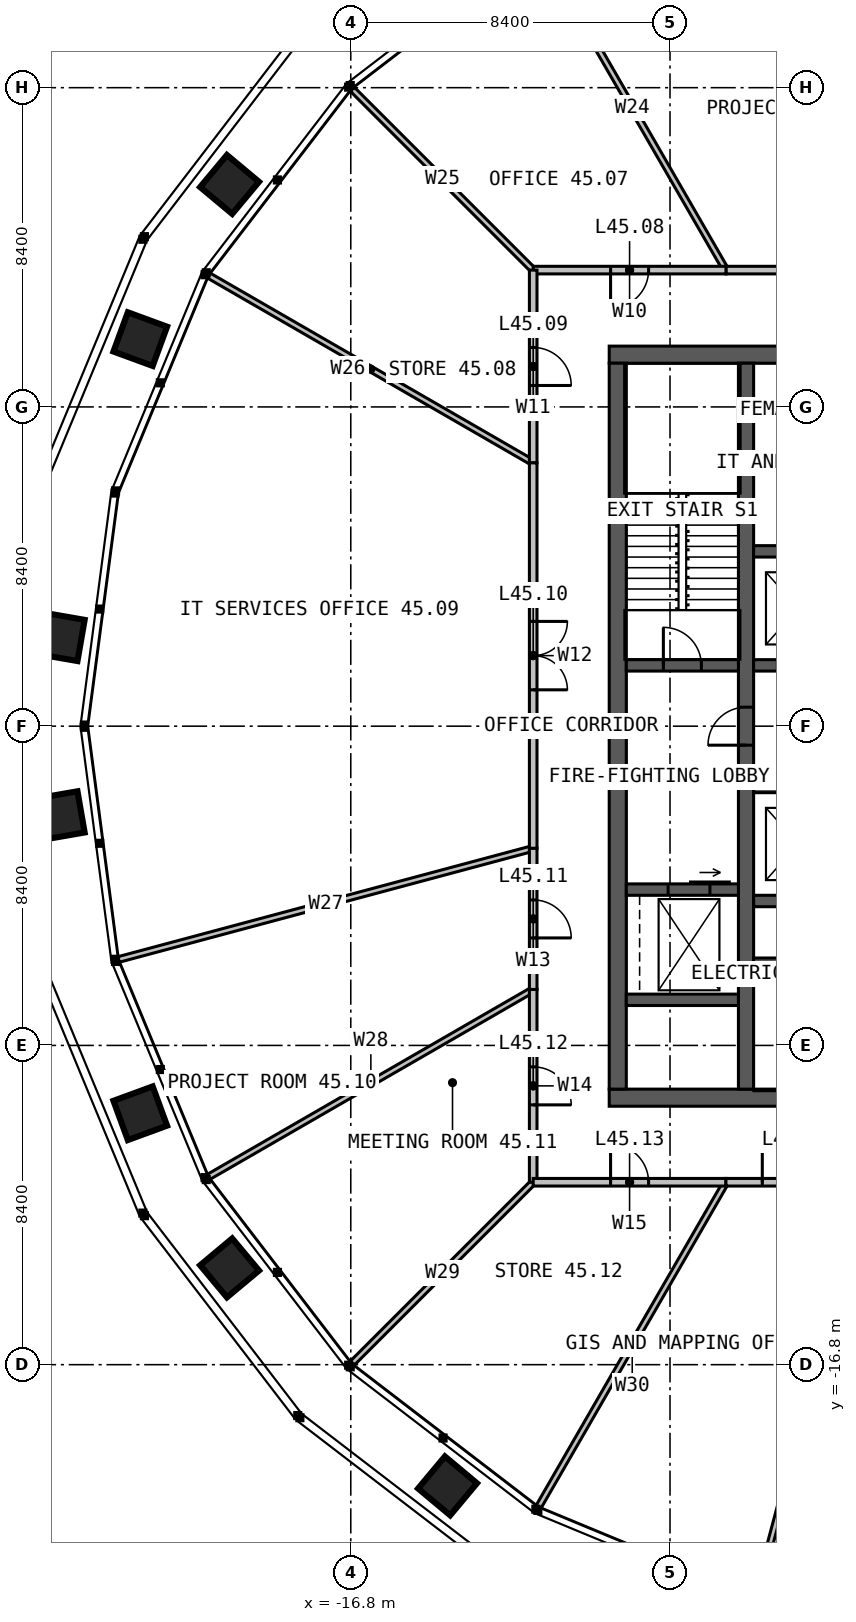
"""IFC4 building model, lengths in metres.
Left out: names, types, materials, properties, quantities, classifications, styles, units other than length and angle.
Written with IfcOpenShell. Run it as: python <this file> out.ifc"""

import sys

from ifc_helpers import new_model, si_unit, direction, frame, frame_2d, origin, place, context, subcontext, project, spatial, rectangle, extrude, element, fill, save


model = new_model("IFC4")
c1 = context("Model", 3, precision=1e-05, world=origin(), true_north=direction((0.0, 1.0)))
c2 = subcontext(c1, "Body", "Model", "MODEL_VIEW")
j1 = project(units=[si_unit("LENGTHUNIT", "METRE"), si_unit("PLANEANGLEUNIT", "RADIAN")], contexts=[c1])
p1 = place(None, origin())
s1 = spatial("IfcSite", under=j1, at=p1, CompositionType="ELEMENT")
p2 = place(p1, origin())
s2 = spatial("IfcBuilding", under=s1, at=p2, CompositionType="ELEMENT")
p3 = place(p2, frame((0.0, 0.0, 187.0)))
s3 = spatial("IfcBuildingStorey", under=s2, at=p3, CompositionType="ELEMENT", Elevation=187.0)
p4 = place(p3, frame((-10.0, 9.775, 0.0), z_axis=(0.0, 0.0, 1.0), x_axis=(1.0, 0.0, 0.0)))
e1 = element("IfcWall", 1, at=p4, inside=s3, PredefinedType="SOLIDWALL", context=c2, shape_type="SweptSolid", body=[
    extrude(rectangle(XDim=20.0, YDim=0.45, at=frame_2d((10.0, 0.0))), origin(), (0.0, 0.0, 1.0), 4.0),
])
p5 = place(p4, frame((9.4, 0.0, 0.0)))
e2 = element("IfcOpeningElement", 2, at=p5, cuts=e1, PredefinedType="OPENING", context=c2, shape_type="SweptSolid", body=[
    extrude(rectangle(XDim=1.2, YDim=2.2, at=frame_2d((0.6, 1.1))), frame((0.0, 0.235, 0.0), z_axis=(0.0, -1.0, 0.0), x_axis=(1.0, 0.0, 0.0)), (0.0, 0.0, 1.0), 0.47),
])
p6 = place(p3, frame((10.0, -9.775, 0.0), z_axis=(0.0, 0.0, 1.0), x_axis=(-1.0, 0.0, 0.0)))
e3 = element("IfcWall", 3, at=p6, inside=s3, PredefinedType="SOLIDWALL", context=c2, shape_type="SweptSolid", body=[
    extrude(rectangle(XDim=20.0, YDim=0.45, at=frame_2d((10.0, 0.0))), origin(), (0.0, 0.0, 1.0), 4.0),
])
p7 = place(p6, frame((6.875, 0.0, 0.0)))
e4 = element("IfcOpeningElement", 4, at=p7, cuts=e3, PredefinedType="OPENING", context=c2, shape_type="SweptSolid", body=[
    extrude(rectangle(XDim=1.2, YDim=2.2, at=frame_2d((0.6, 1.1))), frame((0.0, 0.235, 0.0), z_axis=(0.0, -1.0, 0.0), x_axis=(1.0, 0.0, 0.0)), (0.0, 0.0, 1.0), 0.47),
])
p8 = place(p3, frame((-9.775, 9.55, 0.0), z_axis=(0.0, 0.0, 1.0), x_axis=(0.0, -1.0, 0.0)))
e5 = element("IfcWall", 5, at=p8, inside=s3, PredefinedType="SOLIDWALL", context=c2, shape_type="SweptSolid", body=[
    extrude(rectangle(XDim=19.1, YDim=0.45, at=frame_2d((9.55, 0.0))), origin(), (0.0, 0.0, 1.0), 4.0),
])
p9 = place(p3, frame((-6.4, -9.55, 0.0), z_axis=(0.0, 0.0, 1.0), x_axis=(0.0, 1.0, 0.0)))
e6 = element("IfcWall", 6, at=p9, inside=s3, PredefinedType="SOLIDWALL", context=c2, shape_type="SweptSolid", body=[
    extrude(rectangle(XDim=19.1, YDim=0.4, at=frame_2d((9.55, 0.0))), origin(), (0.0, 0.0, 1.0), 4.0),
])
p10 = place(p9, frame((9.05, 0.0, 0.0)))
e7 = element("IfcOpeningElement", 7, at=p10, cuts=e6, PredefinedType="OPENING", context=c2, shape_type="SweptSolid", body=[
    extrude(rectangle(XDim=1.0, YDim=2.2, at=frame_2d((0.5, 1.1))), frame((0.0, 0.21, 0.0), z_axis=(0.0, -1.0, 0.0), x_axis=(1.0, 0.0, 0.0)), (0.0, 0.0, 1.0), 0.42),
])
p11 = place(p3, frame((-6.2, 1.6, 0.0), z_axis=(0.0, 0.0, 1.0), x_axis=(1.0, 0.0, 0.0)))
e8 = element("IfcWall", 8, at=p11, inside=s3, PredefinedType="SOLIDWALL", context=c2, shape_type="SweptSolid", body=[
    extrude(rectangle(XDim=4.85, YDim=0.3, at=frame_2d((2.425, 0.0))), origin(), (0.0, 0.0, 1.0), 4.0),
])
p12 = place(p11, frame((0.625, 0.0, 0.0)))
e9 = element("IfcOpeningElement", 9, at=p12, cuts=e8, PredefinedType="OPENING", context=c2, shape_type="SweptSolid", body=[
    extrude(rectangle(XDim=1.1, YDim=2.2, at=frame_2d((0.55, 1.1))), frame((0.0, 0.16, 0.0), z_axis=(0.0, -1.0, 0.0), x_axis=(1.0, 0.0, 0.0)), (0.0, 0.0, 1.0), 0.32),
])
p13 = place(p11, frame((3.15, 0.0, 0.0)))
e10 = element("IfcOpeningElement", 10, at=p13, cuts=e8, PredefinedType="OPENING", context=c2, shape_type="SweptSolid", body=[
    extrude(rectangle(XDim=1.1, YDim=2.2, at=frame_2d((0.55, 1.1))), frame((0.0, 0.16, 0.0), z_axis=(0.0, -1.0, 0.0), x_axis=(1.0, 0.0, 0.0)), (0.0, 0.0, 1.0), 0.32),
])
p14 = place(p3, frame((-6.2, 4.6, 0.0), z_axis=(0.0, 0.0, 1.0), x_axis=(1.0, 0.0, 0.0)))
e11 = element("IfcWall", 11, at=p14, inside=s3, PredefinedType="SOLIDWALL", context=c2, shape_type="SweptSolid", body=[
    extrude(rectangle(XDim=4.85, YDim=0.3, at=frame_2d((2.425, 0.0))), origin(), (0.0, 0.0, 1.0), 4.0),
])
for number, where, z_axis, x_axis in (
    (12, (-6.2, -1.6, 0.0), (0.0, 0.0, 1.0), (1.0, 0.0, 0.0)),
    (13, (-6.2, -4.6, 0.0), (0.0, 0.0, 1.0), (1.0, 0.0, 0.0)),
):
    element("IfcWall", number, at=place(p3, frame(where, z_axis=z_axis, x_axis=x_axis)), inside=s3, PredefinedType="SOLIDWALL", context=c2, shape_type="SweptSolid", body=[
        extrude(rectangle(XDim=7.4, YDim=0.3, at=frame_2d((3.7, 0.0))), origin(), (0.0, 0.0, 1.0), 4.0),
    ])
p15 = place(p3, frame((-6.2, -6.2, 0.0), z_axis=(0.0, 0.0, 1.0), x_axis=(1.0, 0.0, 0.0)))
e14 = element("IfcWall", 14, at=p15, inside=s3, PredefinedType="SOLIDWALL", context=c2, shape_type="SweptSolid", body=[
    extrude(rectangle(XDim=7.4, YDim=0.2, at=frame_2d((3.7, 0.0))), origin(), (0.0, 0.0, 1.0), 4.0),
])
p16 = place(p3, frame((-9.55, 1.6, 0.0), z_axis=(0.0, 0.0, 1.0), x_axis=(1.0, 0.0, 0.0)))
e15 = element("IfcWall", 15, at=p16, inside=s3, PredefinedType="SOLIDWALL", context=c2, shape_type="SweptSolid", body=[
    extrude(rectangle(XDim=2.95, YDim=0.3, at=frame_2d((1.475, 0.0))), origin(), (0.0, 0.0, 1.0), 4.0),
])
p17 = place(p16, frame((0.975, 0.0, 0.0)))
e16 = element("IfcOpeningElement", 16, at=p17, cuts=e15, PredefinedType="OPENING", context=c2, shape_type="SweptSolid", body=[
    extrude(rectangle(XDim=1.0, YDim=2.2, at=frame_2d((0.5, 1.1))), frame((0.0, 0.16, 0.0), z_axis=(0.0, -1.0, 0.0), x_axis=(1.0, 0.0, 0.0)), (0.0, 0.0, 1.0), 0.32),
])
p18 = place(p3, frame((-9.55, -4.3, 0.0), z_axis=(0.0, 0.0, 1.0), x_axis=(1.0, 0.0, 0.0)))
e17 = element("IfcWall", 17, at=p18, inside=s3, PredefinedType="SOLIDWALL", context=c2, shape_type="SweptSolid", body=[
    extrude(rectangle(XDim=2.95, YDim=0.3, at=frame_2d((1.475, 0.0))), origin(), (0.0, 0.0, 1.0), 4.0),
])
p19 = place(p18, frame((1.1, 0.0, 0.0)))
e18 = element("IfcOpeningElement", 18, at=p19, cuts=e17, PredefinedType="OPENING", context=c2, shape_type="SweptSolid", body=[
    extrude(rectangle(XDim=1.1, YDim=2.2, at=frame_2d((0.55, 1.1))), frame((0.0, 0.16, 0.0), z_axis=(0.0, -1.0, 0.0), x_axis=(1.0, 0.0, 0.0)), (0.0, 0.0, 1.0), 0.32),
])
p20 = place(p3, frame((-9.55, -7.2, 0.0), z_axis=(0.0, 0.0, 1.0), x_axis=(1.0, 0.0, 0.0)))
e19 = element("IfcWall", 19, at=p20, inside=s3, PredefinedType="SOLIDWALL", context=c2, shape_type="SweptSolid", body=[
    extrude(rectangle(XDim=2.95, YDim=0.3, at=frame_2d((1.475, 0.0))), origin(), (0.0, 0.0, 1.0), 4.0),
])
p21 = place(p3, frame((-6.2, 7.0, 0.0), z_axis=(0.0, 0.0, 1.0), x_axis=(1.0, 0.0, 0.0)))
e20 = element("IfcWall", 20, at=p21, inside=s3, PredefinedType="PARTITIONING", context=c2, shape_type="SweptSolid", body=[
    extrude(rectangle(XDim=3.225, YDim=0.15, at=frame_2d((1.612, 0.0))), origin(), (0.0, 0.0, 1.0), 3.75),
])
p22 = place(p3, frame((-6.928, 12.0, 0.0), z_axis=(0.0, 0.0, 1.0), x_axis=(-0.49999595416, 0.866027739639, 0.0)))
e21 = element("IfcWall", 21, at=p22, inside=s3, PredefinedType="PARTITIONING", context=c2, shape_type="SweptSolid", body=[
    extrude(rectangle(XDim=9.865, YDim=0.15, at=frame_2d((4.932, 0.0))), origin(), (0.0, 0.0, 1.0), 2.79),
])
p23 = place(p3, frame((-12.0, 12.0, 0.0), z_axis=(0.0, 0.0, 1.0), x_axis=(-0.707106781187, 0.707106781187, 0.0)))
e22 = element("IfcWall", 22, at=p23, inside=s3, PredefinedType="PARTITIONING", context=c2, shape_type="SweptSolid", body=[
    extrude(rectangle(XDim=6.751, YDim=0.15, at=frame_2d((3.375, 0.0))), origin(), (0.0, 0.0, 1.0), 2.79),
])
p24 = place(p3, frame((-12.0, 6.928, 0.0), z_axis=(0.0, 0.0, 1.0), x_axis=(-0.866027739639, 0.49999595416, 0.0)))
e23 = element("IfcWall", 23, at=p24, inside=s3, PredefinedType="PARTITIONING", context=c2, shape_type="SweptSolid", body=[
    extrude(rectangle(XDim=9.865, YDim=0.15, at=frame_2d((4.932, 0.0))), origin(), (0.0, 0.0, 1.0), 2.79),
])
p25 = place(p3, frame((-12.0, -3.215, 0.0), z_axis=(0.0, 0.0, 1.0), x_axis=(-0.965926155577, -0.258817816178, 0.0)))
e24 = element("IfcWall", 24, at=p25, inside=s3, PredefinedType="PARTITIONING", context=c2, shape_type="SweptSolid", body=[
    extrude(rectangle(XDim=11.298, YDim=0.15, at=frame_2d((5.649, 0.0))), origin(), (0.0, 0.0, 1.0), 2.79),
])
p26 = place(p3, frame((-12.0, -6.928, 0.0), z_axis=(0.0, 0.0, 1.0), x_axis=(-0.866027739639, -0.49999595416, 0.0)))
e25 = element("IfcWall", 25, at=p26, inside=s3, PredefinedType="PARTITIONING", context=c2, shape_type="SweptSolid", body=[
    extrude(rectangle(XDim=9.865, YDim=0.15, at=frame_2d((4.932, 0.0))), origin(), (0.0, 0.0, 1.0), 2.79),
])
p27 = place(p3, frame((-12.0, -12.0, 0.0), z_axis=(0.0, 0.0, 1.0), x_axis=(-0.707106781187, -0.707106781187, 0.0)))
e26 = element("IfcWall", 26, at=p27, inside=s3, PredefinedType="PARTITIONING", context=c2, shape_type="SweptSolid", body=[
    extrude(rectangle(XDim=6.751, YDim=0.15, at=frame_2d((3.375, 0.0))), origin(), (0.0, 0.0, 1.0), 2.79),
])
p28 = place(p3, frame((-6.928, -12.0, 0.0), z_axis=(0.0, 0.0, 1.0), x_axis=(-0.49999595416, -0.866027739639, 0.0)))
e27 = element("IfcWall", 27, at=p28, inside=s3, PredefinedType="PARTITIONING", context=c2, shape_type="SweptSolid", body=[
    extrude(rectangle(XDim=9.865, YDim=0.15, at=frame_2d((4.932, 0.0))), origin(), (0.0, 0.0, 1.0), 2.79),
])
p29 = place(p3, frame((-3.215, -12.0, 0.0), z_axis=(0.0, 0.0, 1.0), x_axis=(-0.258817816178, -0.965926155577, 0.0)))
e28 = element("IfcWall", 28, at=p29, inside=s3, PredefinedType="PARTITIONING", context=c2, shape_type="SweptSolid", body=[
    extrude(rectangle(XDim=11.298, YDim=0.15, at=frame_2d((5.649, 0.0))), origin(), (0.0, 0.0, 1.0), 2.79),
])
p30 = place(p3, frame((0.0, 12.0, 0.0), z_axis=(0.0, 0.0, 1.0), x_axis=(-1.0, 0.0, 0.0)))
e29 = element("IfcWall", 29, at=p30, inside=s3, PredefinedType="PARTITIONING", context=c2, shape_type="SweptSolid", body=[
    extrude(rectangle(XDim=6.928, YDim=0.2, at=frame_2d((3.464, 0.0))), origin(), (0.0, 0.0, 1.0), 3.8),
])
p31 = place(p30, frame((2.964, 0.0, 0.0)))
e30 = element("IfcOpeningElement", 30, at=p31, cuts=e29, PredefinedType="OPENING", context=c2, shape_type="SweptSolid", body=[
    extrude(rectangle(XDim=1.0, YDim=2.2, at=frame_2d((0.5, 1.1))), frame((0.0, 0.11, 0.0), z_axis=(0.0, -1.0, 0.0), x_axis=(1.0, 0.0, 0.0)), (0.0, 0.0, 1.0), 0.22),
])
p32 = place(p3, frame((-6.928, 12.0, 0.0), z_axis=(0.0, 0.0, 1.0), x_axis=(-1.0, 0.0, 0.0)))
e31 = element("IfcWall", 31, at=p32, inside=s3, PredefinedType="PARTITIONING", context=c2, shape_type="SweptSolid", body=[
    extrude(rectangle(XDim=5.072, YDim=0.2, at=frame_2d((2.536, 0.0))), origin(), (0.0, 0.0, 1.0), 3.8),
])
p33 = place(p32, frame((2.036, 0.0, 0.0)))
e32 = element("IfcOpeningElement", 32, at=p33, cuts=e31, PredefinedType="OPENING", context=c2, shape_type="SweptSolid", body=[
    extrude(rectangle(XDim=1.0, YDim=2.2, at=frame_2d((0.5, 1.1))), frame((0.0, 0.11, 0.0), z_axis=(0.0, -1.0, 0.0), x_axis=(1.0, 0.0, 0.0)), (0.0, 0.0, 1.0), 0.22),
])
p34 = place(p3, frame((-12.0, 12.0, 0.0), z_axis=(0.0, 0.0, 1.0), x_axis=(0.0, -1.0, 0.0)))
e33 = element("IfcWall", 33, at=p34, inside=s3, PredefinedType="PARTITIONING", context=c2, shape_type="SweptSolid", body=[
    extrude(rectangle(XDim=5.072, YDim=0.2, at=frame_2d((2.536, 0.0))), origin(), (0.0, 0.0, 1.0), 3.8),
])
p35 = place(p34, frame((2.036, 0.0, 0.0)))
e34 = element("IfcOpeningElement", 34, at=p35, cuts=e33, PredefinedType="OPENING", context=c2, shape_type="SweptSolid", body=[
    extrude(rectangle(XDim=1.0, YDim=2.2, at=frame_2d((0.5, 1.1))), frame((0.0, 0.11, 0.0), z_axis=(0.0, -1.0, 0.0), x_axis=(1.0, 0.0, 0.0)), (0.0, 0.0, 1.0), 0.22),
])
p36 = place(p3, frame((-12.0, 6.928, 0.0), z_axis=(0.0, 0.0, 1.0), x_axis=(0.0, -1.0, 0.0)))
e35 = element("IfcWall", 35, at=p36, inside=s3, PredefinedType="PARTITIONING", context=c2, shape_type="SweptSolid", body=[
    extrude(rectangle(XDim=10.144, YDim=0.2, at=frame_2d((5.072, 0.0))), origin(), (0.0, 0.0, 1.0), 3.8),
])
p37 = place(p36, frame((4.172, 0.0, 0.0)))
e36 = element("IfcOpeningElement", 36, at=p37, cuts=e35, PredefinedType="OPENING", context=c2, shape_type="SweptSolid", body=[
    extrude(rectangle(XDim=1.8, YDim=2.2, at=frame_2d((0.9, 1.1))), frame((0.0, 0.11, 0.0), z_axis=(0.0, -1.0, 0.0), x_axis=(1.0, 0.0, 0.0)), (0.0, 0.0, 1.0), 0.22),
])
p38 = place(p3, frame((-12.0, -3.215, 0.0), z_axis=(0.0, 0.0, 1.0), x_axis=(0.0, -1.0, 0.0)))
e37 = element("IfcWall", 37, at=p38, inside=s3, PredefinedType="PARTITIONING", context=c2, shape_type="SweptSolid", body=[
    extrude(rectangle(XDim=3.713, YDim=0.2, at=frame_2d((1.856, 0.0))), origin(), (0.0, 0.0, 1.0), 3.8),
])
p39 = place(p38, frame((1.356, 0.0, 0.0)))
e38 = element("IfcOpeningElement", 38, at=p39, cuts=e37, PredefinedType="OPENING", context=c2, shape_type="SweptSolid", body=[
    extrude(rectangle(XDim=1.0, YDim=2.2, at=frame_2d((0.5, 1.1))), frame((0.0, 0.11, 0.0), z_axis=(0.0, -1.0, 0.0), x_axis=(1.0, 0.0, 0.0)), (0.0, 0.0, 1.0), 0.22),
])
p40 = place(p3, frame((-12.0, -6.928, 0.0), z_axis=(0.0, 0.0, 1.0), x_axis=(0.0, -1.0, 0.0)))
e39 = element("IfcWall", 39, at=p40, inside=s3, PredefinedType="PARTITIONING", context=c2, shape_type="SweptSolid", body=[
    extrude(rectangle(XDim=5.072, YDim=0.2, at=frame_2d((2.536, 0.0))), origin(), (0.0, 0.0, 1.0), 3.8),
])
p41 = place(p40, frame((2.036, 0.0, 0.0)))
e40 = element("IfcOpeningElement", 40, at=p41, cuts=e39, PredefinedType="OPENING", context=c2, shape_type="SweptSolid", body=[
    extrude(rectangle(XDim=1.0, YDim=2.2, at=frame_2d((0.5, 1.1))), frame((0.0, 0.11, 0.0), z_axis=(0.0, -1.0, 0.0), x_axis=(1.0, 0.0, 0.0)), (0.0, 0.0, 1.0), 0.22),
])
p42 = place(p3, frame((-12.0, -12.0, 0.0), z_axis=(0.0, 0.0, 1.0), x_axis=(1.0, 0.0, 0.0)))
e41 = element("IfcWall", 41, at=p42, inside=s3, PredefinedType="PARTITIONING", context=c2, shape_type="SweptSolid", body=[
    extrude(rectangle(XDim=5.072, YDim=0.2, at=frame_2d((2.536, 0.0))), origin(), (0.0, 0.0, 1.0), 3.8),
])
p43 = place(p42, frame((2.036, 0.0, 0.0)))
e42 = element("IfcOpeningElement", 42, at=p43, cuts=e41, PredefinedType="OPENING", context=c2, shape_type="SweptSolid", body=[
    extrude(rectangle(XDim=1.0, YDim=2.2, at=frame_2d((0.5, 1.1))), frame((0.0, 0.11, 0.0), z_axis=(0.0, -1.0, 0.0), x_axis=(1.0, 0.0, 0.0)), (0.0, 0.0, 1.0), 0.22),
])
p44 = place(p3, frame((-6.928, -12.0, 0.0), z_axis=(0.0, 0.0, 1.0), x_axis=(1.0, 0.0, 0.0)))
e43 = element("IfcWall", 43, at=p44, inside=s3, PredefinedType="PARTITIONING", context=c2, shape_type="SweptSolid", body=[
    extrude(rectangle(XDim=3.713, YDim=0.2, at=frame_2d((1.856, 0.0))), origin(), (0.0, 0.0, 1.0), 3.8),
])
p45 = place(p44, frame((0.956, 0.0, 0.0)))
e44 = element("IfcOpeningElement", 44, at=p45, cuts=e43, PredefinedType="OPENING", context=c2, shape_type="SweptSolid", body=[
    extrude(rectangle(XDim=1.8, YDim=2.2, at=frame_2d((0.9, 1.1))), frame((0.0, 0.11, 0.0), z_axis=(0.0, -1.0, 0.0), x_axis=(1.0, 0.0, 0.0)), (0.0, 0.0, 1.0), 0.22),
])
p46 = place(p10, origin())
e45 = element("IfcDoor", 45, at=p46, inside=s3, OperationType="SINGLE_SWING_LEFT", PredefinedType="DOOR", context=c2, shape_type="SweptSolid", body=[
    extrude(rectangle(XDim=1.0, YDim=2.2, at=frame_2d((0.5, 1.1))), frame((0.0, 0.025, 0.0), z_axis=(0.0, -1.0, 0.0), x_axis=(1.0, 0.0, 0.0)), (0.0, 0.0, 1.0), 0.05),
])
fill(e7, e45)
p47 = place(p17, origin())
e46 = element("IfcDoor", 46, at=p47, inside=s3, OperationType="SINGLE_SWING_LEFT", PredefinedType="DOOR", context=c2, shape_type="SweptSolid", body=[
    extrude(rectangle(XDim=1.0, YDim=2.2, at=frame_2d((0.5, 1.1))), frame((0.0, 0.025, 0.0), z_axis=(0.0, -1.0, 0.0), x_axis=(1.0, 0.0, 0.0)), (0.0, 0.0, 1.0), 0.05),
])
fill(e16, e46)
p48 = place(p19, origin())
e47 = element("IfcDoor", 47, at=p48, inside=s3, OperationType="SLIDING_TO_LEFT", PredefinedType="DOOR", context=c2, shape_type="SweptSolid", body=[
    extrude(rectangle(XDim=1.1, YDim=2.2, at=frame_2d((0.55, 1.1))), frame((0.0, 0.025, 0.0), z_axis=(0.0, -1.0, 0.0), x_axis=(1.0, 0.0, 0.0)), (0.0, 0.0, 1.0), 0.05),
])
fill(e18, e47)
p49 = place(p33, origin())
e48 = element("IfcDoor", 48, at=p49, inside=s3, OperationType="SINGLE_SWING_RIGHT", PredefinedType="DOOR", context=c2, shape_type="SweptSolid", body=[
    extrude(rectangle(XDim=1.0, YDim=2.2, at=frame_2d((0.5, 1.1))), frame((0.0, 0.025, 0.0), z_axis=(0.0, -1.0, 0.0), x_axis=(1.0, 0.0, 0.0)), (0.0, 0.0, 1.0), 0.05),
])
fill(e32, e48)
p50 = place(p35, origin())
e49 = element("IfcDoor", 49, at=p50, inside=s3, OperationType="SINGLE_SWING_RIGHT", PredefinedType="DOOR", context=c2, shape_type="SweptSolid", body=[
    extrude(rectangle(XDim=1.0, YDim=2.2, at=frame_2d((0.5, 1.1))), frame((0.0, 0.025, 0.0), z_axis=(0.0, -1.0, 0.0), x_axis=(1.0, 0.0, 0.0)), (0.0, 0.0, 1.0), 0.05),
])
fill(e34, e49)
p51 = place(p37, origin())
e50 = element("IfcDoor", 50, at=p51, inside=s3, OperationType="DOUBLE_DOOR_SINGLE_SWING", PredefinedType="DOOR", context=c2, shape_type="SweptSolid", body=[
    extrude(rectangle(XDim=1.8, YDim=2.2, at=frame_2d((0.9, 1.1))), frame((0.0, 0.025, 0.0), z_axis=(0.0, -1.0, 0.0), x_axis=(1.0, 0.0, 0.0)), (0.0, 0.0, 1.0), 0.05),
])
fill(e36, e50)
p52 = place(p39, origin())
e51 = element("IfcDoor", 51, at=p52, inside=s3, OperationType="SINGLE_SWING_RIGHT", PredefinedType="DOOR", context=c2, shape_type="SweptSolid", body=[
    extrude(rectangle(XDim=1.0, YDim=2.2, at=frame_2d((0.5, 1.1))), frame((0.0, 0.025, 0.0), z_axis=(0.0, -1.0, 0.0), x_axis=(1.0, 0.0, 0.0)), (0.0, 0.0, 1.0), 0.05),
])
fill(e38, e51)
p53 = place(p41, origin())
e52 = element("IfcDoor", 52, at=p53, inside=s3, OperationType="SINGLE_SWING_RIGHT", PredefinedType="DOOR", context=c2, shape_type="SweptSolid", body=[
    extrude(rectangle(XDim=1.0, YDim=2.2, at=frame_2d((0.5, 1.1))), frame((0.0, 0.025, 0.0), z_axis=(0.0, -1.0, 0.0), x_axis=(1.0, 0.0, 0.0)), (0.0, 0.0, 1.0), 0.05),
])
fill(e40, e52)
p54 = place(p43, origin())
e53 = element("IfcDoor", 53, at=p54, inside=s3, OperationType="SINGLE_SWING_LEFT", PredefinedType="DOOR", context=c2, shape_type="SweptSolid", body=[
    extrude(rectangle(XDim=1.0, YDim=2.2, at=frame_2d((0.5, 1.1))), frame((0.0, 0.025, 0.0), z_axis=(0.0, -1.0, 0.0), x_axis=(1.0, 0.0, 0.0)), (0.0, 0.0, 1.0), 0.05),
])
fill(e42, e53)
p55 = place(p45, origin())
e54 = element("IfcDoor", 54, at=p55, inside=s3, OperationType="DOUBLE_DOOR_SINGLE_SWING", PredefinedType="DOOR", context=c2, shape_type="SweptSolid", body=[
    extrude(rectangle(XDim=1.8, YDim=2.2, at=frame_2d((0.9, 1.1))), frame((0.0, 0.025, 0.0), z_axis=(0.0, -1.0, 0.0), x_axis=(1.0, 0.0, 0.0)), (0.0, 0.0, 1.0), 0.05),
])
fill(e44, e54)
save(model, sys.argv[1])
